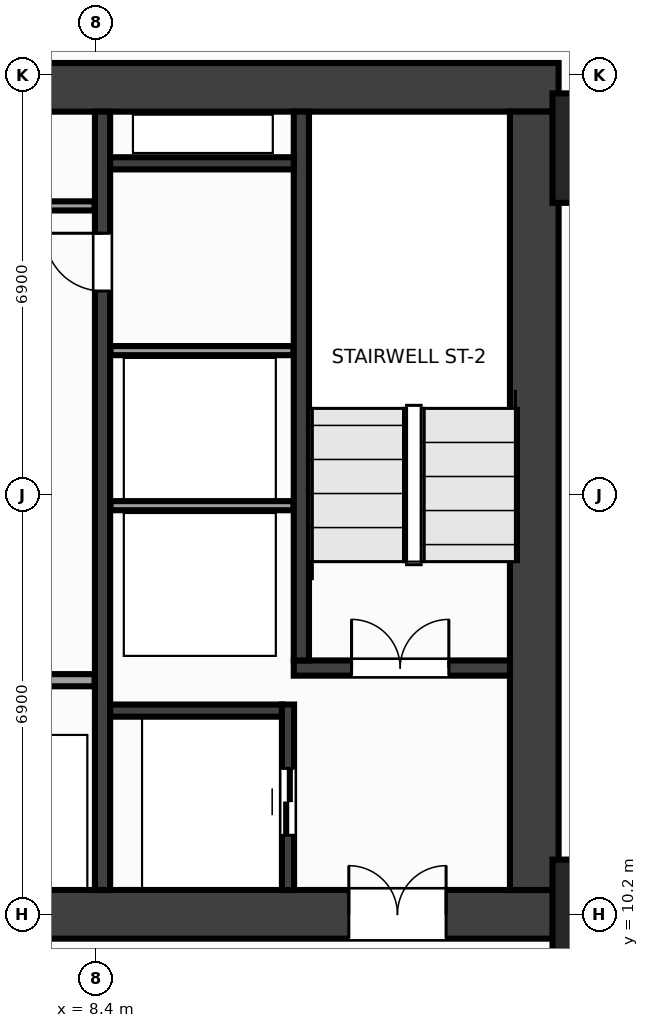
"""IFC4 building model, lengths in metres.
Left out: names, types, materials, properties, quantities, classifications, styles, units other than length and angle.
Written with IfcOpenShell. Run it as: python <this file> out.ifc"""

import sys

from ifc_helpers import new_model, si_unit, direction, frame, frame_2d, origin, origin_2d, place, context, subcontext, project, spatial, rectangle, extrude, source, transform, mapped, element, fill, save


model = new_model("IFC4")
c1 = context("Model", 3, precision=1e-05, world=origin(), true_north=direction((0.0, 1.0)))
c2 = subcontext(c1, "Body", "Model", "MODEL_VIEW")
j1 = project(units=[si_unit("LENGTHUNIT", "METRE"), si_unit("PLANEANGLEUNIT", "RADIAN")], contexts=[c1])
p1 = place(None, origin())
s1 = spatial("IfcSite", under=j1, at=p1, CompositionType="ELEMENT")
p2 = place(p1, origin())
s2 = spatial("IfcBuilding", under=s1, at=p2, CompositionType="ELEMENT")
p3 = place(p2, frame((0.0, 0.0, 56.0)))
s3 = spatial("IfcBuildingStorey", under=s2, at=p3, CompositionType="ELEMENT", Elevation=56.0)
m1 = source(origin(), c2, "Body", "SweptSolid", [
    extrude(rectangle(XDim=32.0, YDim=0.8, at=frame_2d((16.0, 0.0))), origin(), (0.0, 0.0, 1.0), 3.6),
])
p4 = place(p3, frame((-16.0, 23.8, 0.0), z_axis=(0.0, 0.0, 1.0), x_axis=(1.0, 0.0, 0.0)))
e1 = element("IfcWall", 1, at=p4, inside=s3, PredefinedType="SHEAR", context=c2, shape_type="MappedRepresentation", body=[
    mapped(m1, transform((0.0, 0.0, 0.0), x_axis=(1.0, 0.0, 0.0), y_axis=(0.0, 1.0, 0.0), z_axis=(0.0, 0.0, 1.0), scale=1.0)),
])
p5 = place(p3, frame((-16.0, 10.2, 0.0), z_axis=(0.0, 0.0, 1.0), x_axis=(1.0, 0.0, 0.0)))
e2 = element("IfcWall", 2, at=p5, inside=s3, PredefinedType="SHEAR", context=c2, shape_type="MappedRepresentation", body=[
    mapped(m1, transform((0.0, 0.0, 0.0), x_axis=(1.0, 0.0, 0.0), y_axis=(0.0, 1.0, 0.0), z_axis=(0.0, 0.0, 1.0), scale=1.0)),
])
p6 = place(p5, frame((1.85, 0.0, 0.0)))
e3 = element("IfcOpeningElement", 3, at=p6, cuts=e2, PredefinedType="OPENING", context=c2, shape_type="SweptSolid", body=[
    extrude(rectangle(XDim=1.6, YDim=2.15, at=frame_2d((0.8, 1.075))), frame((0.0, 0.412, 0.0), z_axis=(0.0, -1.0, 0.0), x_axis=(1.0, 0.0, 0.0)), (0.0, 0.0, 1.0), 0.824),
])
p7 = place(p5, frame((28.55, 0.0, 0.0)))
e4 = element("IfcOpeningElement", 4, at=p7, cuts=e2, PredefinedType="OPENING", context=c2, shape_type="SweptSolid", body=[
    extrude(rectangle(XDim=1.6, YDim=2.15, at=frame_2d((0.8, 1.075))), frame((0.0, 0.412, 0.0), z_axis=(0.0, -1.0, 0.0), x_axis=(1.0, 0.0, 0.0)), (0.0, 0.0, 1.0), 0.824),
])
p8 = place(p5, frame((15.25, 0.0, 0.0)))
e5 = element("IfcOpeningElement", 5, at=p8, cuts=e2, PredefinedType="OPENING", context=c2, shape_type="SweptSolid", body=[
    extrude(rectangle(XDim=1.5, YDim=2.2, at=frame_2d((0.75, 1.1))), frame((0.0, 0.412, 0.0), z_axis=(0.0, -1.0, 0.0), x_axis=(1.0, 0.0, 0.0)), (0.0, 0.0, 1.0), 0.824),
])
m2 = source(origin(), c2, "Body", "SweptSolid", [
    extrude(rectangle(XDim=12.8, YDim=0.8, at=frame_2d((6.4, 0.0))), origin(), (0.0, 0.0, 1.0), 3.6),
])
p9 = place(p3, frame((15.6, 10.6, 0.0), z_axis=(0.0, 0.0, 1.0), x_axis=(0.0, 1.0, 0.0)))
e6 = element("IfcWall", 6, at=p9, inside=s3, PredefinedType="SHEAR", context=c2, shape_type="MappedRepresentation", body=[
    mapped(m2, transform((0.0, 0.0, 0.0), x_axis=(1.0, 0.0, 0.0), y_axis=(0.0, 1.0, 0.0), z_axis=(0.0, 0.0, 1.0), scale=1.0)),
])
m3 = source(origin(), c2, "Body", "SweptSolid", [
    extrude(rectangle(XDim=12.8, YDim=0.25, at=frame_2d((6.4, 0.0))), origin(), (0.0, 0.0, 1.0), 3.6),
])
p10 = place(p3, frame((8.5, 10.6, 0.0), z_axis=(0.0, 0.0, 1.0), x_axis=(0.0, 1.0, 0.0)))
e7 = element("IfcWall", 7, at=p10, inside=s3, PredefinedType="SHEAR", context=c2, shape_type="MappedRepresentation", body=[
    mapped(m3, transform((0.0, 0.0, 0.0), x_axis=(1.0, 0.0, 0.0), y_axis=(0.0, 1.0, 0.0), z_axis=(0.0, 0.0, 1.0), scale=1.0)),
])
p11 = place(p10, frame((9.85, 0.0, 0.0)))
e8 = element("IfcOpeningElement", 8, at=p11, cuts=e7, PredefinedType="OPENING", context=c2, shape_type="SweptSolid", body=[
    extrude(rectangle(XDim=0.95, YDim=2.15, at=frame_2d((0.475, 1.075))), frame((0.0, 0.137, 0.0), z_axis=(0.0, -1.0, 0.0), x_axis=(1.0, 0.0, 0.0)), (0.0, 0.0, 1.0), 0.274),
])
m4 = source(origin(), c2, "Body", "SweptSolid", [
    extrude(rectangle(XDim=3.555, YDim=0.25, at=frame_2d((1.777, 0.0))), origin(), (0.0, 0.0, 1.0), 3.6),
])
p12 = place(p3, frame((11.645, 14.25, 0.0), z_axis=(0.0, 0.0, 1.0), x_axis=(1.0, 0.0, 0.0)))
e9 = element("IfcWall", 9, at=p12, inside=s3, PredefinedType="SHEAR", context=c2, shape_type="MappedRepresentation", body=[
    mapped(m4, transform((0.0, 0.0, 0.0), x_axis=(1.0, 0.0, 0.0), y_axis=(0.0, 1.0, 0.0), z_axis=(0.0, 0.0, 1.0), scale=1.0)),
])
p13 = place(p12, frame((0.95, 0.0, 0.0)))
e10 = element("IfcOpeningElement", 10, at=p13, cuts=e9, PredefinedType="OPENING", context=c2, shape_type="SweptSolid", body=[
    extrude(rectangle(XDim=1.6, YDim=2.15, at=frame_2d((0.8, 1.075))), frame((0.0, 0.137, 0.0), z_axis=(0.0, -1.0, 0.0), x_axis=(1.0, 0.0, 0.0)), (0.0, 0.0, 1.0), 0.274),
])
m5 = source(origin(), c2, "Body", "SweptSolid", [
    extrude(rectangle(XDim=9.025, YDim=0.25, at=frame_2d((4.512, 0.0))), origin(), (0.0, 0.0, 1.0), 3.6),
])
p14 = place(p3, frame((11.77, 14.375, 0.0), z_axis=(0.0, 0.0, 1.0), x_axis=(0.0, 1.0, 0.0)))
e11 = element("IfcWall", 11, at=p14, inside=s3, PredefinedType="SHEAR", context=c2, shape_type="MappedRepresentation", body=[
    mapped(m5, transform((0.0, 0.0, 0.0), x_axis=(1.0, 0.0, 0.0), y_axis=(0.0, 1.0, 0.0), z_axis=(0.0, 0.0, 1.0), scale=1.0)),
])
m6 = source(origin(), c2, "Body", "SweptSolid", [
    extrude(rectangle(XDim=3.05, YDim=0.2, at=frame_2d((1.525, 0.0))), origin(), (0.0, 0.0, 1.0), 3.6),
])
p15 = place(p3, frame((11.55, 10.6, 0.0), z_axis=(0.0, 0.0, 1.0), x_axis=(0.0, 1.0, 0.0)))
e12 = element("IfcWall", 12, at=p15, inside=s3, PredefinedType="SHEAR", context=c2, shape_type="MappedRepresentation", body=[
    mapped(m6, transform((0.0, 0.0, 0.0), x_axis=(1.0, 0.0, 0.0), y_axis=(0.0, 1.0, 0.0), z_axis=(0.0, 0.0, 1.0), scale=1.0)),
])
p16 = place(p15, frame((0.9, 0.0, 0.0)))
e13 = element("IfcOpeningElement", 13, at=p16, cuts=e12, PredefinedType="OPENING", context=c2, shape_type="SweptSolid", body=[
    extrude(rectangle(XDim=1.1, YDim=2.15, at=frame_2d((0.55, 1.075))), frame((0.0, 0.112, 0.0), z_axis=(0.0, -1.0, 0.0), x_axis=(1.0, 0.0, 0.0)), (0.0, 0.0, 1.0), 0.224),
])
m7 = source(origin(), c2, "Body", "SweptSolid", [
    extrude(rectangle(XDim=2.825, YDim=0.2, at=frame_2d((1.413, 0.0))), origin(), (0.0, 0.0, 1.0), 3.6),
])
p17 = place(p3, frame((8.625, 13.55, 0.0), z_axis=(0.0, 0.0, 1.0), x_axis=(1.0, 0.0, 0.0)))
e14 = element("IfcWall", 14, at=p17, inside=s3, PredefinedType="SHEAR", context=c2, shape_type="MappedRepresentation", body=[
    mapped(m7, transform((0.0, 0.0, 0.0), x_axis=(1.0, 0.0, 0.0), y_axis=(0.0, 1.0, 0.0), z_axis=(0.0, 0.0, 1.0), scale=1.0)),
])
m8 = source(origin(), c2, "Body", "SweptSolid", [
    extrude(rectangle(XDim=3.02, YDim=0.2, at=frame_2d((1.51, 0.0))), origin(), (0.0, 0.0, 1.0), 3.6),
])
p18 = place(p3, frame((8.625, 22.55, 0.0), z_axis=(0.0, 0.0, 1.0), x_axis=(1.0, 0.0, 0.0)))
e15 = element("IfcWall", 15, at=p18, inside=s3, PredefinedType="SHEAR", context=c2, shape_type="MappedRepresentation", body=[
    mapped(m8, transform((0.0, 0.0, 0.0), x_axis=(1.0, 0.0, 0.0), y_axis=(0.0, 1.0, 0.0), z_axis=(0.0, 0.0, 1.0), scale=1.0)),
])
m9 = source(origin(), c2, "Body", "SweptSolid", [
    extrude(rectangle(XDim=1.8, YDim=1.8, at=origin_2d()), origin(), (0.0, 0.0, 1.0), 3.6),
])
for number, where, z_axis, x_axis in (
    (16, (16.8, 10.2, 0.0), (0.0, 0.0, 1.0), (1.0, 0.0, 0.0)),
    (17, (16.8, 22.8, 0.0), (0.0, 0.0, 1.0), (1.0, 0.0, 0.0)),
):
    element("IfcColumn", number, at=place(p3, frame(where, z_axis=z_axis, x_axis=x_axis)), inside=s3, PredefinedType="COLUMN", context=c2, shape_type="MappedRepresentation", body=[
        mapped(m9, transform((0.0, 0.0, 0.0), x_axis=(1.0, 0.0, 0.0), y_axis=(0.0, 1.0, 0.0), z_axis=(0.0, 0.0, 1.0), scale=1.0)),
    ])
m10 = source(origin(), c2, "Body", "SweptSolid", [
    extrude(rectangle(XDim=3.01, YDim=0.15, at=frame_2d((1.505, 0.0))), origin(), (0.0, 0.0, 1.0), 3.36),
])
for number, where, z_axis, x_axis in (
    (18, (8.63, 16.92, 0.0), (0.0, 0.0, 1.0), (1.0, 0.0, 0.0)),
    (19, (8.63, 19.47, 0.0), (0.0, 0.0, 1.0), (1.0, 0.0, 0.0)),
):
    element("IfcWall", number, at=place(p3, frame(where, z_axis=z_axis, x_axis=x_axis)), inside=s3, PredefinedType="PARTITIONING", context=c2, shape_type="MappedRepresentation", body=[
        mapped(m10, transform((0.0, 0.0, 0.0), x_axis=(1.0, 0.0, 0.0), y_axis=(0.0, 1.0, 0.0), z_axis=(0.0, 0.0, 1.0), scale=1.0)),
    ])
m11 = source(origin(), c2, "Body", "SweptSolid", [
    extrude(rectangle(XDim=7.07, YDim=0.2, at=frame_2d((3.535, 0.0))), origin(), (0.0, 0.0, 1.0), 3.36),
])
p19 = place(p3, frame((1.3, 14.05, 0.0), z_axis=(0.0, 0.0, 1.0), x_axis=(1.0, 0.0, 0.0)))
e20 = element("IfcWall", 20, at=p19, inside=s3, PredefinedType="PARTITIONING", context=c2, shape_type="MappedRepresentation", body=[
    mapped(m11, transform((0.0, 0.0, 0.0), x_axis=(1.0, 0.0, 0.0), y_axis=(0.0, 1.0, 0.0), z_axis=(0.0, 0.0, 1.0), scale=1.0)),
])
m12 = source(origin(), c2, "Body", "SweptSolid", [
    extrude(rectangle(XDim=2.07, YDim=0.15, at=frame_2d((1.035, 0.0))), origin(), (0.0, 0.0, 1.0), 3.36),
])
p20 = place(p3, frame((6.3, 21.85, 0.0), z_axis=(0.0, 0.0, 1.0), x_axis=(1.0, 0.0, 0.0)))
e21 = element("IfcWall", 21, at=p20, inside=s3, PredefinedType="PARTITIONING", context=c2, shape_type="MappedRepresentation", body=[
    mapped(m12, transform((0.0, 0.0, 0.0), x_axis=(1.0, 0.0, 0.0), y_axis=(0.0, 1.0, 0.0), z_axis=(0.0, 0.0, 1.0), scale=1.0)),
])
m13 = source(origin(), c2, "Body", "SweptSolid", [
    extrude(rectangle(XDim=1.6, YDim=2.15, at=frame_2d((0.8, 1.075))), frame((0.0, 0.025, 0.0), z_axis=(0.0, -1.0, 0.0), x_axis=(1.0, 0.0, 0.0)), (0.0, 0.0, 1.0), 0.05),
])
p21 = place(p13, origin())
e22 = element("IfcDoor", 22, at=p21, inside=s3, OperationType="DOUBLE_DOOR_SINGLE_SWING", PredefinedType="DOOR", context=c2, shape_type="MappedRepresentation", body=[
    mapped(m13, transform((0.0, 0.0, 0.0), x_axis=(1.0, 0.0, 0.0), y_axis=(0.0, 1.0, 0.0), z_axis=(0.0, 0.0, 1.0), scale=1.0)),
])
fill(e10, e22)
p22 = place(p7, origin())
e23 = element("IfcDoor", 23, at=p22, inside=s3, OperationType="DOUBLE_DOOR_SINGLE_SWING", PredefinedType="DOOR", context=c2, shape_type="MappedRepresentation", body=[
    mapped(m13, transform((0.0, 0.0, 0.0), x_axis=(1.0, 0.0, 0.0), y_axis=(0.0, 1.0, 0.0), z_axis=(0.0, 0.0, 1.0), scale=1.0)),
])
fill(e4, e23)
m14 = source(origin(), c2, "Body", "SweptSolid", [
    extrude(rectangle(XDim=1.1, YDim=2.15, at=frame_2d((0.55, 1.075))), frame((0.0, 0.025, 0.0), z_axis=(0.0, -1.0, 0.0), x_axis=(1.0, 0.0, 0.0)), (0.0, 0.0, 1.0), 0.05),
])
p23 = place(p16, origin())
e24 = element("IfcDoor", 24, at=p23, inside=s3, OperationType="DOUBLE_DOOR_SLIDING", PredefinedType="DOOR", context=c2, shape_type="MappedRepresentation", body=[
    mapped(m14, transform((0.0, 0.0, 0.0), x_axis=(1.0, 0.0, 0.0), y_axis=(0.0, 1.0, 0.0), z_axis=(0.0, 0.0, 1.0), scale=1.0)),
])
fill(e13, e24)
m15 = source(origin(), c2, "Body", "SweptSolid", [
    extrude(rectangle(XDim=0.95, YDim=2.15, at=frame_2d((0.475, 1.075))), frame((0.0, 0.025, 0.0), z_axis=(0.0, -1.0, 0.0), x_axis=(1.0, 0.0, 0.0)), (0.0, 0.0, 1.0), 0.05),
])
p24 = place(p11, origin())
e25 = element("IfcDoor", 25, at=p24, inside=s3, OperationType="SINGLE_SWING_RIGHT", PredefinedType="DOOR", context=c2, shape_type="MappedRepresentation", body=[
    mapped(m15, transform((0.0, 0.0, 0.0), x_axis=(1.0, 0.0, 0.0), y_axis=(0.0, 1.0, 0.0), z_axis=(0.0, 0.0, 1.0), scale=1.0)),
])
fill(e8, e25)
save(model, sys.argv[1])
